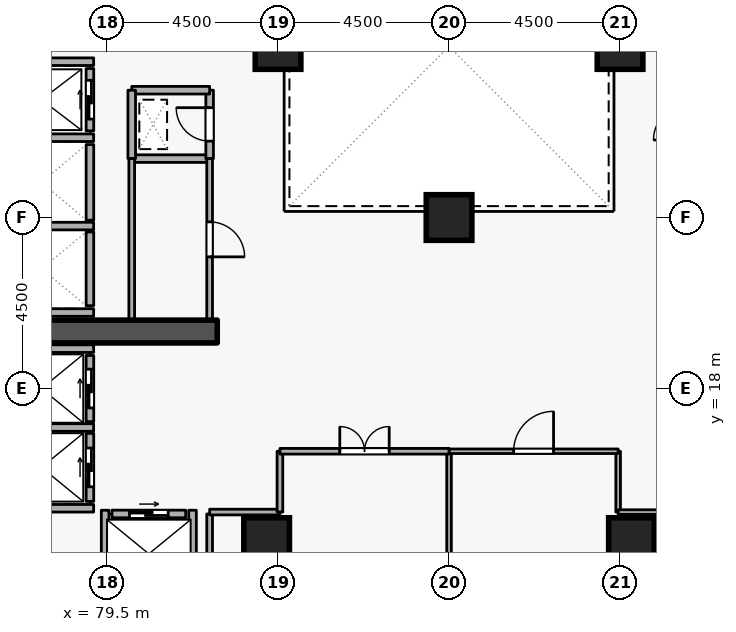
"""IFC4 building model, lengths in metres.
Left out: names, types, materials, properties, quantities, classifications, styles, units other than length and angle.
Written with IfcOpenShell. Run it as: python <this file> out.ifc"""

import sys

from ifc_helpers import new_model, si_unit, direction, frame, frame_2d, origin, origin_2d, place, context, subcontext, project, spatial, rectangle, extrude, element, fill, save


model = new_model("IFC4")
c1 = context("Model", 3, precision=1e-05, world=origin(), true_north=direction((0.0, 1.0)))
c2 = subcontext(c1, "Body", "Model", "MODEL_VIEW")
j1 = project(units=[si_unit("LENGTHUNIT", "METRE"), si_unit("PLANEANGLEUNIT", "RADIAN")], contexts=[c1])
p1 = place(None, origin())
s1 = spatial("IfcSite", under=j1, at=p1, CompositionType="ELEMENT")
p2 = place(p1, origin())
s2 = spatial("IfcBuilding", under=s1, at=p2, CompositionType="ELEMENT")
p3 = place(p2, frame((0.0, 0.0, 75.9)))
s3 = spatial("IfcBuildingStorey", under=s2, at=p3, CompositionType="ELEMENT", Elevation=75.9)
p4 = place(p3, frame((76.7, 19.5, 0.0), z_axis=(0.0, 0.0, 1.0), x_axis=(1.0, 0.0, 0.0)))
e1 = element("IfcWall", 1, at=p4, inside=s3, PredefinedType="SHEAR", context=c2, shape_type="SweptSolid", body=[
    extrude(rectangle(XDim=5.7, YDim=0.6, at=frame_2d((2.85, 0.0))), origin(), (0.0, 0.0, 1.0), 4.2),
])
for number, where, z_axis, x_axis in (
    (2, (93.3, 14.0, 0.0), (0.0, 0.0, 1.0), (1.0, 0.0, 0.0)),
    (3, (83.7, 14.0, 0.0), (0.0, 0.0, 1.0), (1.0, 0.0, 0.0)),
    (4, (93.0, 27.0, 0.0), (0.0, 0.0, 1.0), (1.0, 0.0, 0.0)),
    (5, (84.0, 27.0, 0.0), (0.0, 0.0, 1.0), (1.0, 0.0, 0.0)),
    (6, (88.5, 22.5, 0.0), (0.0, 0.0, 1.0), (1.0, 0.0, 0.0)),
):
    element("IfcColumn", number, at=place(p3, frame(where, z_axis=z_axis, x_axis=x_axis)), inside=s3, PredefinedType="COLUMN", context=c2, shape_type="SweptSolid", body=[
        extrude(rectangle(XDim=1.2, YDim=1.2, at=origin_2d()), origin(), (0.0, 0.0, 1.0), 4.2),
    ])
p5 = place(p3, frame((79.05, 24.78, 0.0), z_axis=(0.0, 0.0, 1.0), x_axis=(0.0, 1.0, 0.0)))
e7 = element("IfcWall", 7, at=p5, inside=s3, PredefinedType="STANDARD", context=c2, shape_type="SweptSolid", body=[
    extrude(rectangle(XDim=1.64, YDim=0.2, at=frame_2d((0.82, 0.0))), origin(), (0.0, 0.0, 1.0), 3.94),
])
p6 = place(p5, frame((0.31, 0.0, 0.0)))
e8 = element("IfcOpeningElement", 8, at=p6, cuts=e7, PredefinedType="OPENING", context=c2, shape_type="SweptSolid", body=[
    extrude(rectangle(XDim=1.02, YDim=2.06, at=frame_2d((0.51, 1.03))), frame((0.0, 0.11, 0.0), z_axis=(0.0, -1.0, 0.0), x_axis=(1.0, 0.0, 0.0)), (0.0, 0.0, 1.0), 0.22),
])
p7 = place(p3, frame((79.05, 22.43, 0.0), z_axis=(0.0, 0.0, 1.0), x_axis=(0.0, 1.0, 0.0)))
e9 = element("IfcWall", 9, at=p7, inside=s3, PredefinedType="STANDARD", context=c2, shape_type="SweptSolid", body=[
    extrude(rectangle(XDim=1.99, YDim=0.2, at=frame_2d((0.995, 0.0))), origin(), (0.0, 0.0, 1.0), 3.94),
])
p8 = place(p3, frame((79.05, 20.18, 0.0), z_axis=(0.0, 0.0, 1.0), x_axis=(0.0, 1.0, 0.0)))
e10 = element("IfcWall", 10, at=p8, inside=s3, PredefinedType="STANDARD", context=c2, shape_type="SweptSolid", body=[
    extrude(rectangle(XDim=1.94, YDim=0.2, at=frame_2d((0.97, 0.0))), origin(), (0.0, 0.0, 1.0), 3.94),
])
p9 = place(p3, frame((79.05, 17.13, 0.0), z_axis=(0.0, 0.0, 1.0), x_axis=(0.0, 1.0, 0.0)))
e11 = element("IfcWall", 11, at=p9, inside=s3, PredefinedType="STANDARD", context=c2, shape_type="SweptSolid", body=[
    extrude(rectangle(XDim=1.74, YDim=0.2, at=frame_2d((0.87, 0.0))), origin(), (0.0, 0.0, 1.0), 3.94),
])
p10 = place(p9, frame((0.36, 0.0, 0.0)))
e12 = element("IfcOpeningElement", 12, at=p10, cuts=e11, PredefinedType="OPENING", context=c2, shape_type="SweptSolid", body=[
    extrude(rectangle(XDim=1.02, YDim=2.06, at=frame_2d((0.51, 1.03))), frame((0.0, 0.11, 0.0), z_axis=(0.0, -1.0, 0.0), x_axis=(1.0, 0.0, 0.0)), (0.0, 0.0, 1.0), 0.22),
])
p11 = place(p3, frame((79.05, 15.03, 0.0), z_axis=(0.0, 0.0, 1.0), x_axis=(0.0, 1.0, 0.0)))
e13 = element("IfcWall", 13, at=p11, inside=s3, PredefinedType="STANDARD", context=c2, shape_type="SweptSolid", body=[
    extrude(rectangle(XDim=1.79, YDim=0.2, at=frame_2d((0.895, 0.0))), origin(), (0.0, 0.0, 1.0), 3.94),
])
p12 = place(p11, frame((0.385, 0.0, 0.0)))
e14 = element("IfcOpeningElement", 14, at=p12, cuts=e13, PredefinedType="OPENING", context=c2, shape_type="SweptSolid", body=[
    extrude(rectangle(XDim=1.02, YDim=2.06, at=frame_2d((0.51, 1.03))), frame((0.0, 0.11, 0.0), z_axis=(0.0, -1.0, 0.0), x_axis=(1.0, 0.0, 0.0)), (0.0, 0.0, 1.0), 0.22),
])
p13 = place(p3, frame((79.63, 14.7, 0.0), z_axis=(0.0, 0.0, 1.0), x_axis=(1.0, 0.0, 0.0)))
e15 = element("IfcWall", 15, at=p13, inside=s3, PredefinedType="STANDARD", context=c2, shape_type="SweptSolid", body=[
    extrude(rectangle(XDim=1.94, YDim=0.2, at=frame_2d((0.97, 0.0))), origin(), (0.0, 0.0, 1.0), 3.94),
])
p14 = place(p13, frame((0.46, 0.0, 0.0)))
e16 = element("IfcOpeningElement", 16, at=p14, cuts=e15, PredefinedType="OPENING", context=c2, shape_type="SweptSolid", body=[
    extrude(rectangle(XDim=1.02, YDim=2.06, at=frame_2d((0.51, 1.03))), frame((0.0, 0.11, 0.0), z_axis=(0.0, -1.0, 0.0), x_axis=(1.0, 0.0, 0.0)), (0.0, 0.0, 1.0), 0.22),
])
for number, where, z_axis, x_axis in (
    (17, (76.712, 26.6, 0.0), (0.0, 0.0, 1.0), (1.0, 0.0, 0.0)),
    (18, (76.712, 24.6, 0.0), (0.0, 0.0, 1.0), (1.0, 0.0, 0.0)),
    (19, (76.712, 22.275, 0.0), (0.0, 0.0, 1.0), (1.0, 0.0, 0.0)),
    (20, (76.712, 20.0, 0.0), (0.0, 0.0, 1.0), (1.0, 0.0, 0.0)),
):
    element("IfcWall", number, at=place(p3, frame(where, z_axis=z_axis, x_axis=x_axis)), inside=s3, PredefinedType="STANDARD", context=c2, shape_type="SweptSolid", body=[
        extrude(rectangle(XDim=2.436, YDim=0.2, at=frame_2d((1.218, 0.0))), origin(), (0.0, 0.0, 1.0), 3.94),
    ])
p15 = place(p3, frame((76.402, 19.05, 0.0), z_axis=(0.0, 0.0, 1.0), x_axis=(1.0, 0.0, 0.0)))
e21 = element("IfcWall", 21, at=p15, inside=s3, PredefinedType="STANDARD", context=c2, shape_type="SweptSolid", body=[
    extrude(rectangle(XDim=2.746, YDim=0.2, at=frame_2d((1.373, 0.0))), origin(), (0.0, 0.0, 1.0), 3.145),
])
p16 = place(p3, frame((76.402, 16.975, 0.0), z_axis=(0.0, 0.0, 1.0), x_axis=(1.0, 0.0, 0.0)))
e22 = element("IfcWall", 22, at=p16, inside=s3, PredefinedType="STANDARD", context=c2, shape_type="SweptSolid", body=[
    extrude(rectangle(XDim=2.746, YDim=0.2, at=frame_2d((1.373, 0.0))), origin(), (0.0, 0.0, 1.0), 3.94),
])
p17 = place(p3, frame((76.512, 14.85, 0.0), z_axis=(0.0, 0.0, 1.0), x_axis=(1.0, 0.0, 0.0)))
e23 = element("IfcWall", 23, at=p17, inside=s3, PredefinedType="STANDARD", context=c2, shape_type="SweptSolid", body=[
    extrude(rectangle(XDim=2.636, YDim=0.2, at=frame_2d((1.318, 0.0))), origin(), (0.0, 0.0, 1.0), 3.94),
])
for number, where, z_axis, x_axis in (
    (24, (81.75, 12.612, 0.0), (0.0, 0.0, 1.0), (0.0, 1.0, 0.0)),
    (25, (79.45, 12.612, 0.0), (0.0, 0.0, 1.0), (0.0, 1.0, 0.0)),
):
    element("IfcWall", number, at=place(p3, frame(where, z_axis=z_axis, x_axis=x_axis)), inside=s3, PredefinedType="STANDARD", context=c2, shape_type="SweptSolid", body=[
        extrude(rectangle(XDim=2.186, YDim=0.2, at=frame_2d((1.093, 0.0))), origin(), (0.0, 0.0, 1.0), 3.94),
    ])
p18 = place(p3, frame((80.15, 24.05, 0.0), z_axis=(0.0, 0.0, 1.0), x_axis=(1.0, 0.0, 0.0)))
e26 = element("IfcWall", 26, at=p18, inside=s3, PredefinedType="STANDARD", context=c2, shape_type="SweptSolid", body=[
    extrude(rectangle(XDim=2.05, YDim=0.2, at=frame_2d((1.025, 0.0))), origin(), (0.0, 0.0, 1.0), 3.94),
])
p19 = place(p3, frame((82.2, 24.05, 0.0), z_axis=(0.0, 0.0, 1.0), x_axis=(0.0, 1.0, 0.0)))
e27 = element("IfcWall", 27, at=p19, inside=s3, PredefinedType="STANDARD", context=c2, shape_type="SweptSolid", body=[
    extrude(rectangle(XDim=1.8, YDim=0.2, at=frame_2d((0.9, 0.0))), origin(), (0.0, 0.0, 1.0), 3.94),
])
p20 = place(p19, frame((0.46, 0.0, 0.0)))
e28 = element("IfcOpeningElement", 28, at=p20, cuts=e27, PredefinedType="OPENING", context=c2, shape_type="SweptSolid", body=[
    extrude(rectangle(XDim=0.88, YDim=2.04, at=frame_2d((0.44, 1.02))), frame((0.0, 0.11, 0.0), z_axis=(0.0, -1.0, 0.0), x_axis=(1.0, 0.0, 0.0)), (0.0, 0.0, 1.0), 0.22),
])
p21 = place(p3, frame((82.2, 25.85, 0.0), z_axis=(0.0, 0.0, 1.0), x_axis=(-1.0, 0.0, 0.0)))
e29 = element("IfcWall", 29, at=p21, inside=s3, PredefinedType="STANDARD", context=c2, shape_type="SweptSolid", body=[
    extrude(rectangle(XDim=2.05, YDim=0.2, at=frame_2d((1.025, 0.0))), origin(), (0.0, 0.0, 1.0), 3.94),
])
p22 = place(p3, frame((80.15, 25.85, 0.0), z_axis=(0.0, 0.0, 1.0), x_axis=(0.0, -1.0, 0.0)))
e30 = element("IfcWall", 30, at=p22, inside=s3, PredefinedType="STANDARD", context=c2, shape_type="SweptSolid", body=[
    extrude(rectangle(XDim=1.8, YDim=0.2, at=frame_2d((0.9, 0.0))), origin(), (0.0, 0.0, 1.0), 3.94),
])
p23 = place(p3, frame((80.15, 19.8, 0.0), z_axis=(0.0, 0.0, 1.0), x_axis=(0.0, 1.0, 0.0)))
e31 = element("IfcWall", 31, at=p23, inside=s3, PredefinedType="PARTITIONING", context=c2, shape_type="SweptSolid", body=[
    extrude(rectangle(XDim=4.25, YDim=0.15, at=frame_2d((2.125, 0.0))), origin(), (0.0, 0.0, 1.0), 3.94),
])
p24 = place(p3, frame((82.2, 24.05, 0.0), z_axis=(0.0, 0.0, 1.0), x_axis=(0.0, -1.0, 0.0)))
e32 = element("IfcWall", 32, at=p24, inside=s3, PredefinedType="PARTITIONING", context=c2, shape_type="SweptSolid", body=[
    extrude(rectangle(XDim=4.25, YDim=0.15, at=frame_2d((2.125, 0.0))), origin(), (0.0, 0.0, 1.0), 3.94),
])
p25 = place(p24, frame((1.665, 0.0, 0.0)))
e33 = element("IfcOpeningElement", 33, at=p25, cuts=e32, PredefinedType="OPENING", context=c2, shape_type="SweptSolid", body=[
    extrude(rectangle(XDim=0.92, YDim=2.08, at=frame_2d((0.46, 1.04))), frame((0.0, 0.085, 0.0), z_axis=(0.0, -1.0, 0.0), x_axis=(1.0, 0.0, 0.0)), (0.0, 0.0, 1.0), 0.17),
])
p26 = place(p3, frame((92.95, 16.35, 0.0), z_axis=(0.0, 0.0, 1.0), x_axis=(0.0, -1.0, 0.0)))
e34 = element("IfcWall", 34, at=p26, inside=s3, PredefinedType="PARTITIONING", context=c2, shape_type="SweptSolid", body=[
    extrude(rectangle(XDim=1.6, YDim=0.12, at=frame_2d((0.8, 0.0))), origin(), (0.0, 0.0, 1.0), 3.94),
])
p27 = place(p3, frame((92.95, 14.75, 0.0), z_axis=(0.0, 0.0, 1.0), x_axis=(1.0, 0.0, 0.0)))
e35 = element("IfcWall", 35, at=p27, inside=s3, PredefinedType="PARTITIONING", context=c2, shape_type="SweptSolid", body=[
    extrude(rectangle(XDim=1.85, YDim=0.12, at=frame_2d((0.925, 0.0))), origin(), (0.0, 0.0, 1.0), 3.94),
])
p28 = place(p3, frame((88.5, 9.08, 0.0), z_axis=(0.0, 0.0, 1.0), x_axis=(0.0, 1.0, 0.0)))
e36 = element("IfcWall", 36, at=p28, inside=s3, PredefinedType="PARTITIONING", context=c2, shape_type="SweptSolid", body=[
    extrude(rectangle(XDim=7.27, YDim=0.12, at=frame_2d((3.635, 0.0))), origin(), (0.0, 0.0, 1.0), 3.482),
])
p29 = place(p3, frame((88.5, 16.35, 0.0), z_axis=(0.0, 0.0, 1.0), x_axis=(1.0, 0.0, 0.0)))
e37 = element("IfcWall", 37, at=p29, inside=s3, PredefinedType="PARTITIONING", context=c2, shape_type="SweptSolid", body=[
    extrude(rectangle(XDim=4.45, YDim=0.12, at=frame_2d((2.225, 0.0))), origin(), (0.0, 0.0, 1.0), 3.94),
])
p30 = place(p29, frame((1.7, 0.0, 0.0)))
e38 = element("IfcOpeningElement", 38, at=p30, cuts=e37, PredefinedType="OPENING", context=c2, shape_type="SweptSolid", body=[
    extrude(rectangle(XDim=1.05, YDim=2.1, at=frame_2d((0.525, 1.05))), frame((0.0, 0.07, 0.0), z_axis=(0.0, -1.0, 0.0), x_axis=(1.0, 0.0, 0.0)), (0.0, 0.0, 1.0), 0.14),
])
p31 = place(p3, frame((82.2, 12.4, 0.0), z_axis=(0.0, 0.0, 1.0), x_axis=(0.0, 1.0, 0.0)))
e39 = element("IfcWall", 39, at=p31, inside=s3, PredefinedType="PARTITIONING", context=c2, shape_type="SweptSolid", body=[
    extrude(rectangle(XDim=2.3, YDim=0.15, at=frame_2d((1.15, 0.0))), origin(), (0.0, 0.0, 1.0), 3.94),
])
p32 = place(p3, frame((82.2, 14.75, 0.0), z_axis=(0.0, 0.0, 1.0), x_axis=(1.0, 0.0, 0.0)))
e40 = element("IfcWall", 40, at=p32, inside=s3, PredefinedType="PARTITIONING", context=c2, shape_type="SweptSolid", body=[
    extrude(rectangle(XDim=1.85, YDim=0.15, at=frame_2d((0.925, 0.0))), origin(), (0.0, 0.0, 1.0), 3.94),
])
p33 = place(p3, frame((84.05, 14.75, 0.0), z_axis=(0.0, 0.0, 1.0), x_axis=(0.0, 1.0, 0.0)))
e41 = element("IfcWall", 41, at=p33, inside=s3, PredefinedType="PARTITIONING", context=c2, shape_type="SweptSolid", body=[
    extrude(rectangle(XDim=1.6, YDim=0.15, at=frame_2d((0.8, 0.0))), origin(), (0.0, 0.0, 1.0), 3.94),
])
p34 = place(p3, frame((84.05, 16.35, 0.0), z_axis=(0.0, 0.0, 1.0), x_axis=(1.0, 0.0, 0.0)))
e42 = element("IfcWall", 42, at=p34, inside=s3, PredefinedType="PARTITIONING", context=c2, shape_type="SweptSolid", body=[
    extrude(rectangle(XDim=4.45, YDim=0.15, at=frame_2d((2.225, 0.0))), origin(), (0.0, 0.0, 1.0), 3.94),
])
p35 = place(p34, frame((1.575, 0.0, 0.0)))
e43 = element("IfcOpeningElement", 43, at=p35, cuts=e42, PredefinedType="OPENING", context=c2, shape_type="SweptSolid", body=[
    extrude(rectangle(XDim=1.3, YDim=2.12, at=frame_2d((0.65, 1.06))), frame((0.0, 0.085, 0.0), z_axis=(0.0, -1.0, 0.0), x_axis=(1.0, 0.0, 0.0)), (0.0, 0.0, 1.0), 0.17),
])
p36 = place(p6, origin())
e44 = element("IfcDoor", 44, at=p36, inside=s3, OperationType="SLIDING_TO_LEFT", PredefinedType="DOOR", context=c2, shape_type="SweptSolid", body=[
    extrude(rectangle(XDim=1.02, YDim=2.06, at=frame_2d((0.51, 1.03))), frame((0.0, 0.025, 0.0), z_axis=(0.0, -1.0, 0.0), x_axis=(1.0, 0.0, 0.0)), (0.0, 0.0, 1.0), 0.05),
])
fill(e8, e44)
p37 = place(p10, origin())
e45 = element("IfcDoor", 45, at=p37, inside=s3, OperationType="SLIDING_TO_LEFT", PredefinedType="DOOR", context=c2, shape_type="SweptSolid", body=[
    extrude(rectangle(XDim=1.02, YDim=2.06, at=frame_2d((0.51, 1.03))), frame((0.0, 0.025, 0.0), z_axis=(0.0, -1.0, 0.0), x_axis=(1.0, 0.0, 0.0)), (0.0, 0.0, 1.0), 0.05),
])
fill(e12, e45)
p38 = place(p12, origin())
e46 = element("IfcDoor", 46, at=p38, inside=s3, OperationType="SLIDING_TO_LEFT", PredefinedType="DOOR", context=c2, shape_type="SweptSolid", body=[
    extrude(rectangle(XDim=1.02, YDim=2.06, at=frame_2d((0.51, 1.03))), frame((0.0, 0.025, 0.0), z_axis=(0.0, -1.0, 0.0), x_axis=(1.0, 0.0, 0.0)), (0.0, 0.0, 1.0), 0.05),
])
fill(e14, e46)
p39 = place(p14, origin())
e47 = element("IfcDoor", 47, at=p39, inside=s3, OperationType="SLIDING_TO_LEFT", PredefinedType="DOOR", context=c2, shape_type="SweptSolid", body=[
    extrude(rectangle(XDim=1.02, YDim=2.06, at=frame_2d((0.51, 1.03))), frame((0.0, 0.025, 0.0), z_axis=(0.0, -1.0, 0.0), x_axis=(1.0, 0.0, 0.0)), (0.0, 0.0, 1.0), 0.05),
])
fill(e16, e47)
p40 = place(p20, origin())
e48 = element("IfcDoor", 48, at=p40, inside=s3, OperationType="SINGLE_SWING_RIGHT", PredefinedType="DOOR", context=c2, shape_type="SweptSolid", body=[
    extrude(rectangle(XDim=0.88, YDim=2.04, at=frame_2d((0.44, 1.02))), frame((0.0, 0.025, 0.0), z_axis=(0.0, -1.0, 0.0), x_axis=(1.0, 0.0, 0.0)), (0.0, 0.0, 1.0), 0.05),
])
fill(e28, e48)
p41 = place(p25, origin())
e49 = element("IfcDoor", 49, at=p41, inside=s3, OperationType="SINGLE_SWING_RIGHT", PredefinedType="DOOR", context=c2, shape_type="SweptSolid", body=[
    extrude(rectangle(XDim=0.92, YDim=2.08, at=frame_2d((0.46, 1.04))), frame((0.0, 0.025, 0.0), z_axis=(0.0, -1.0, 0.0), x_axis=(1.0, 0.0, 0.0)), (0.0, 0.0, 1.0), 0.05),
])
fill(e33, e49)
p42 = place(p30, origin())
e50 = element("IfcDoor", 50, at=p42, inside=s3, OperationType="SINGLE_SWING_RIGHT", PredefinedType="DOOR", context=c2, shape_type="SweptSolid", body=[
    extrude(rectangle(XDim=1.05, YDim=2.1, at=frame_2d((0.525, 1.05))), frame((0.0, 0.025, 0.0), z_axis=(0.0, -1.0, 0.0), x_axis=(1.0, 0.0, 0.0)), (0.0, 0.0, 1.0), 0.05),
])
fill(e38, e50)
p43 = place(p35, origin())
e51 = element("IfcDoor", 51, at=p43, inside=s3, OperationType="DOUBLE_DOOR_SINGLE_SWING", PredefinedType="DOOR", context=c2, shape_type="SweptSolid", body=[
    extrude(rectangle(XDim=1.3, YDim=2.12, at=frame_2d((0.65, 1.06))), frame((0.0, 0.025, 0.0), z_axis=(0.0, -1.0, 0.0), x_axis=(1.0, 0.0, 0.0)), (0.0, 0.0, 1.0), 0.05),
])
fill(e43, e51)
save(model, sys.argv[1])
